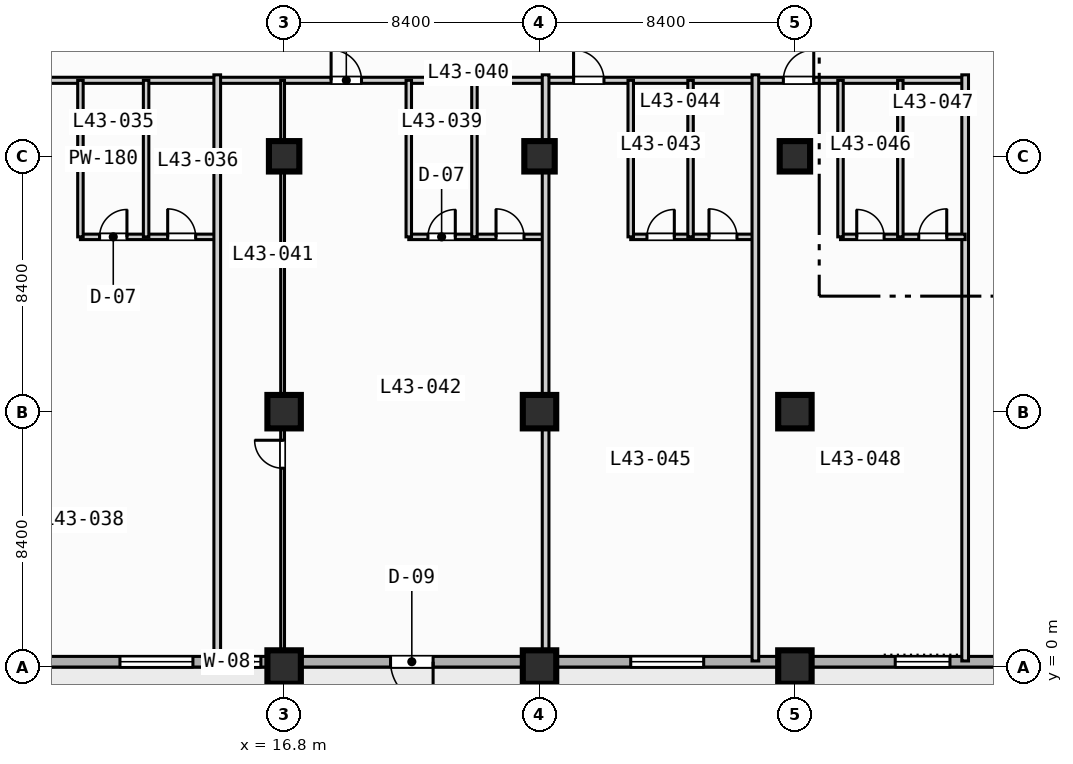
"""IFC4 building model, lengths in metres.
Left out: names, types, materials, properties, quantities, classifications, styles, units other than length and angle.
Written with IfcOpenShell. Run it as: python <this file> out.ifc"""

import sys

from ifc_helpers import new_model, si_unit, direction, frame, frame_2d, origin, origin_2d, place, context, subcontext, project, spatial, rectangle, extrude, element, fill, save


model = new_model("IFC4")
c1 = context("Model", 3, precision=1e-05, world=origin(), true_north=direction((0.0, 1.0)))
c2 = subcontext(c1, "Body", "Model", "MODEL_VIEW")
j1 = project(units=[si_unit("LENGTHUNIT", "METRE"), si_unit("PLANEANGLEUNIT", "RADIAN")], contexts=[c1])
p1 = place(None, origin())
s1 = spatial("IfcSite", under=j1, at=p1, CompositionType="ELEMENT")
p2 = place(p1, origin())
s2 = spatial("IfcBuilding", under=s1, at=p2, CompositionType="ELEMENT")
p3 = place(p2, frame((0.0, 0.0, 179.1)))
s3 = spatial("IfcBuildingStorey", under=s2, at=p3, CompositionType="ELEMENT", Elevation=179.1)
for number, where, z_axis, x_axis in (
    (1, (16.8, 0.0, 0.0), (0.0, 0.0, 1.0), (1.0, 0.0, 0.0)),
    (2, (16.8, 8.4, 0.0), (0.0, 0.0, 1.0), (1.0, 0.0, 0.0)),
):
    element("IfcColumn", number, at=place(p3, frame(where, z_axis=z_axis, x_axis=x_axis)), inside=s3, PredefinedType="COLUMN", context=c2, shape_type="SweptSolid", body=[
        extrude(rectangle(XDim=1.1, YDim=1.1, at=origin_2d()), origin(), (0.0, 0.0, 1.0), 3.7),
    ])
p4 = place(p3, frame((16.8, 16.8, 0.0), z_axis=(0.0, 0.0, 1.0), x_axis=(1.0, 0.0, 0.0)))
e3 = element("IfcColumn", 3, at=p4, inside=s3, PredefinedType="COLUMN", context=c2, shape_type="SweptSolid", body=[
    extrude(rectangle(XDim=1.0, YDim=1.0, at=origin_2d()), origin(), (0.0, 0.0, 1.0), 3.7),
])
for number, where, z_axis, x_axis in (
    (4, (25.2, 0.0, 0.0), (0.0, 0.0, 1.0), (1.0, 0.0, 0.0)),
    (5, (25.2, 8.4, 0.0), (0.0, 0.0, 1.0), (1.0, 0.0, 0.0)),
):
    element("IfcColumn", number, at=place(p3, frame(where, z_axis=z_axis, x_axis=x_axis)), inside=s3, PredefinedType="COLUMN", context=c2, shape_type="SweptSolid", body=[
        extrude(rectangle(XDim=1.1, YDim=1.1, at=origin_2d()), origin(), (0.0, 0.0, 1.0), 3.7),
    ])
p5 = place(p3, frame((25.2, 16.8, 0.0), z_axis=(0.0, 0.0, 1.0), x_axis=(1.0, 0.0, 0.0)))
e6 = element("IfcColumn", 6, at=p5, inside=s3, PredefinedType="COLUMN", context=c2, shape_type="SweptSolid", body=[
    extrude(rectangle(XDim=1.0, YDim=1.0, at=origin_2d()), origin(), (0.0, 0.0, 1.0), 3.7),
])
for number, where, z_axis, x_axis in (
    (7, (33.6, 0.0, 0.0), (0.0, 0.0, 1.0), (1.0, 0.0, 0.0)),
    (8, (33.6, 8.4, 0.0), (0.0, 0.0, 1.0), (1.0, 0.0, 0.0)),
):
    element("IfcColumn", number, at=place(p3, frame(where, z_axis=z_axis, x_axis=x_axis)), inside=s3, PredefinedType="COLUMN", context=c2, shape_type="SweptSolid", body=[
        extrude(rectangle(XDim=1.1, YDim=1.1, at=origin_2d()), origin(), (0.0, 0.0, 1.0), 3.7),
    ])
p6 = place(p3, frame((33.6, 16.8, 0.0), z_axis=(0.0, 0.0, 1.0), x_axis=(1.0, 0.0, 0.0)))
e9 = element("IfcColumn", 9, at=p6, inside=s3, PredefinedType="COLUMN", context=c2, shape_type="SweptSolid", body=[
    extrude(rectangle(XDim=1.0, YDim=1.0, at=origin_2d()), origin(), (0.0, 0.0, 1.0), 3.7),
])
p7 = place(p3, frame((72.425, 0.175, 0.0), z_axis=(0.0, 0.0, 1.0), x_axis=(-1.0, 0.0, 0.0)))
e10 = element("IfcWall", 10, at=p7, inside=s3, PredefinedType="STANDARD", context=c2, shape_type="SweptSolid", body=[
    extrude(rectangle(XDim=69.25, YDim=0.35, at=frame_2d((34.625, 0.0))), origin(), (0.0, 0.0, 1.0), 3.47),
])
p8 = place(p7, frame((50.725, 0.0, 0.0)))
e11 = element("IfcOpeningElement", 11, at=p8, cuts=e10, PredefinedType="OPENING", context=c2, shape_type="SweptSolid", body=[
    extrude(rectangle(XDim=1.4, YDim=2.2, at=frame_2d((0.7, 1.1))), frame((0.0, 0.185, 0.0), z_axis=(0.0, -1.0, 0.0), x_axis=(1.0, 0.0, 0.0)), (0.0, 0.0, 1.0), 0.37),
])
p9 = place(p7, frame((58.625, 0.0, 0.85)))
e12 = element("IfcOpeningElement", 12, at=p9, cuts=e10, PredefinedType="OPENING", context=c2, shape_type="SweptSolid", body=[
    extrude(rectangle(XDim=2.4, YDim=1.95, at=frame_2d((1.2, 0.975))), frame((0.0, 0.185, 0.0), z_axis=(0.0, -1.0, 0.0), x_axis=(1.0, 0.0, 0.0)), (0.0, 0.0, 1.0), 0.37),
])
p10 = place(p7, frame((41.825, 0.0, 0.85)))
e13 = element("IfcOpeningElement", 13, at=p10, cuts=e10, PredefinedType="OPENING", context=c2, shape_type="SweptSolid", body=[
    extrude(rectangle(XDim=2.4, YDim=1.95, at=frame_2d((1.2, 0.975))), frame((0.0, 0.185, 0.0), z_axis=(0.0, -1.0, 0.0), x_axis=(1.0, 0.0, 0.0)), (0.0, 0.0, 1.0), 0.37),
])
p11 = place(p7, frame((33.725, 0.0, 0.85)))
e14 = element("IfcOpeningElement", 14, at=p11, cuts=e10, PredefinedType="OPENING", context=c2, shape_type="SweptSolid", body=[
    extrude(rectangle(XDim=1.8, YDim=1.8, at=frame_2d((0.9, 0.9))), frame((0.0, 0.185, 0.0), z_axis=(0.0, -1.0, 0.0), x_axis=(1.0, 0.0, 0.0)), (0.0, 0.0, 1.0), 0.37),
])
p12 = place(p7, frame((25.025, 0.0, 0.85)))
e15 = element("IfcOpeningElement", 15, at=p12, cuts=e10, PredefinedType="OPENING", context=c2, shape_type="SweptSolid", body=[
    extrude(rectangle(XDim=2.4, YDim=1.95, at=frame_2d((1.2, 0.975))), frame((0.0, 0.185, 0.0), z_axis=(0.0, -1.0, 0.0), x_axis=(1.0, 0.0, 0.0)), (0.0, 0.0, 1.0), 0.37),
])
p13 = place(p7, frame((67.075, 0.0, 0.85)))
e16 = element("IfcOpeningElement", 16, at=p13, cuts=e10, PredefinedType="OPENING", context=c2, shape_type="SweptSolid", body=[
    extrude(rectangle(XDim=1.8, YDim=1.8, at=frame_2d((0.9, 0.9))), frame((0.0, 0.185, 0.0), z_axis=(0.0, -1.0, 0.0), x_axis=(1.0, 0.0, 0.0)), (0.0, 0.0, 1.0), 0.37),
])
p14 = place(p7, frame((56.39, 0.0, 0.85)))
e17 = element("IfcOpeningElement", 17, at=p14, cuts=e10, PredefinedType="OPENING", context=c2, shape_type="SweptSolid", body=[
    extrude(rectangle(XDim=0.72, YDim=1.8, at=frame_2d((0.36, 0.9))), frame((0.0, 0.185, 0.0), z_axis=(0.0, -1.0, 0.0), x_axis=(1.0, 0.0, 0.0)), (0.0, 0.0, 1.0), 0.37),
])
p15 = place(p7, frame((9.075, 0.0, 0.85)))
e18 = element("IfcOpeningElement", 18, at=p15, cuts=e10, PredefinedType="OPENING", context=c2, shape_type="SweptSolid", body=[
    extrude(rectangle(XDim=1.8, YDim=1.8, at=frame_2d((0.9, 0.9))), frame((0.0, 0.185, 0.0), z_axis=(0.0, -1.0, 0.0), x_axis=(1.0, 0.0, 0.0)), (0.0, 0.0, 1.0), 0.37),
])
p16 = place(p7, frame((2.675, 0.0, 0.85)))
e19 = element("IfcOpeningElement", 19, at=p16, cuts=e10, PredefinedType="OPENING", context=c2, shape_type="SweptSolid", body=[
    extrude(rectangle(XDim=1.8, YDim=1.8, at=frame_2d((0.9, 0.9))), frame((0.0, 0.185, 0.0), z_axis=(0.0, -1.0, 0.0), x_axis=(1.0, 0.0, 0.0)), (0.0, 0.0, 1.0), 0.37),
])
p17 = place(p3, frame((3.4, 19.3, 0.0), z_axis=(0.0, 0.0, 1.0), x_axis=(1.0, 0.0, 0.0)))
e20 = element("IfcWall", 20, at=p17, inside=s3, PredefinedType="PARTITIONING", context=c2, shape_type="SweptSolid", body=[
    extrude(rectangle(XDim=35.8, YDim=0.2, at=frame_2d((17.9, 0.0))), origin(), (0.0, 0.0, 1.0), 3.47),
])
p18 = place(p17, frame((3.92, 0.0, 0.0)))
e21 = element("IfcOpeningElement", 21, at=p18, cuts=e20, PredefinedType="OPENING", context=c2, shape_type="SweptSolid", body=[
    extrude(rectangle(XDim=1.0, YDim=2.15, at=frame_2d((0.5, 1.075))), frame((0.0, 0.11, 0.0), z_axis=(0.0, -1.0, 0.0), x_axis=(1.0, 0.0, 0.0)), (0.0, 0.0, 1.0), 0.22),
])
p19 = place(p17, frame((14.945, 0.0, 0.0)))
e22 = element("IfcOpeningElement", 22, at=p19, cuts=e20, PredefinedType="OPENING", context=c2, shape_type="SweptSolid", body=[
    extrude(rectangle(XDim=1.0, YDim=2.15, at=frame_2d((0.5, 1.075))), frame((0.0, 0.11, 0.0), z_axis=(0.0, -1.0, 0.0), x_axis=(1.0, 0.0, 0.0)), (0.0, 0.0, 1.0), 0.22),
])
p20 = place(p17, frame((22.92, 0.0, 0.0)))
e23 = element("IfcOpeningElement", 23, at=p20, cuts=e20, PredefinedType="OPENING", context=c2, shape_type="SweptSolid", body=[
    extrude(rectangle(XDim=1.0, YDim=2.15, at=frame_2d((0.5, 1.075))), frame((0.0, 0.11, 0.0), z_axis=(0.0, -1.0, 0.0), x_axis=(1.0, 0.0, 0.0)), (0.0, 0.0, 1.0), 0.22),
])
p21 = place(p17, frame((29.82, 0.0, 0.0)))
e24 = element("IfcOpeningElement", 24, at=p21, cuts=e20, PredefinedType="OPENING", context=c2, shape_type="SweptSolid", body=[
    extrude(rectangle(XDim=1.0, YDim=2.15, at=frame_2d((0.5, 1.075))), frame((0.0, 0.11, 0.0), z_axis=(0.0, -1.0, 0.0), x_axis=(1.0, 0.0, 0.0)), (0.0, 0.0, 1.0), 0.22),
])
p22 = place(p3, frame((10.1, 14.15, 0.0), z_axis=(0.0, 0.0, 1.0), x_axis=(1.0, 0.0, 0.0)))
e25 = element("IfcWall", 25, at=p22, inside=s3, PredefinedType="PLUMBINGWALL", context=c2, shape_type="SweptSolid", body=[
    extrude(rectangle(XDim=4.5, YDim=0.18, at=frame_2d((2.25, 0.0))), origin(), (0.0, 0.0, 1.0), 3.47),
])
p23 = place(p22, frame((0.63, 0.0, 0.0)))
e26 = element("IfcOpeningElement", 26, at=p23, cuts=e25, PredefinedType="OPENING", context=c2, shape_type="SweptSolid", body=[
    extrude(rectangle(XDim=0.9, YDim=2.1, at=frame_2d((0.45, 1.05))), frame((0.0, 0.1, 0.0), z_axis=(0.0, -1.0, 0.0), x_axis=(1.0, 0.0, 0.0)), (0.0, 0.0, 1.0), 0.2),
])
p24 = place(p22, frame((2.87, 0.0, 0.0)))
e27 = element("IfcOpeningElement", 27, at=p24, cuts=e25, PredefinedType="OPENING", context=c2, shape_type="SweptSolid", body=[
    extrude(rectangle(XDim=0.92, YDim=2.1, at=frame_2d((0.46, 1.05))), frame((0.0, 0.1, 0.0), z_axis=(0.0, -1.0, 0.0), x_axis=(1.0, 0.0, 0.0)), (0.0, 0.0, 1.0), 0.2),
])
for number, where, z_axis, x_axis in (
    (28, (10.1, 14.15, 0.0), (0.0, 0.0, 1.0), (0.0, 1.0, 0.0)),
    (29, (12.26, 14.15, 0.0), (0.0, 0.0, 1.0), (0.0, 1.0, 0.0)),
):
    element("IfcWall", number, at=place(p3, frame(where, z_axis=z_axis, x_axis=x_axis)), inside=s3, PredefinedType="PLUMBINGWALL", context=c2, shape_type="SweptSolid", body=[
        extrude(rectangle(XDim=5.15, YDim=0.18, at=frame_2d((2.575, 0.0))), origin(), (0.0, 0.0, 1.0), 3.47),
    ])
p25 = place(p3, frame((14.6, 0.2, 0.0), z_axis=(0.0, 0.0, 1.0), x_axis=(0.0, 1.0, 0.0)))
e30 = element("IfcWall", 30, at=p25, inside=s3, PredefinedType="PARTITIONING", context=c2, shape_type="SweptSolid", body=[
    extrude(rectangle(XDim=19.28, YDim=0.22, at=frame_2d((9.64, 0.0))), origin(), (0.0, 0.0, 1.0), 3.47),
])
p26 = place(p3, frame((20.9, 14.15, 0.0), z_axis=(0.0, 0.0, 1.0), x_axis=(1.0, 0.0, 0.0)))
e31 = element("IfcWall", 31, at=p26, inside=s3, PredefinedType="PLUMBINGWALL", context=c2, shape_type="SweptSolid", body=[
    extrude(rectangle(XDim=4.5, YDim=0.18, at=frame_2d((2.25, 0.0))), origin(), (0.0, 0.0, 1.0), 3.47),
])
p27 = place(p26, frame((0.63, 0.0, 0.0)))
e32 = element("IfcOpeningElement", 32, at=p27, cuts=e31, PredefinedType="OPENING", context=c2, shape_type="SweptSolid", body=[
    extrude(rectangle(XDim=0.9, YDim=2.1, at=frame_2d((0.45, 1.05))), frame((0.0, 0.1, 0.0), z_axis=(0.0, -1.0, 0.0), x_axis=(1.0, 0.0, 0.0)), (0.0, 0.0, 1.0), 0.2),
])
p28 = place(p26, frame((2.87, 0.0, 0.0)))
e33 = element("IfcOpeningElement", 33, at=p28, cuts=e31, PredefinedType="OPENING", context=c2, shape_type="SweptSolid", body=[
    extrude(rectangle(XDim=0.92, YDim=2.1, at=frame_2d((0.46, 1.05))), frame((0.0, 0.1, 0.0), z_axis=(0.0, -1.0, 0.0), x_axis=(1.0, 0.0, 0.0)), (0.0, 0.0, 1.0), 0.2),
])
for number, where, z_axis, x_axis in (
    (34, (20.9, 14.15, 0.0), (0.0, 0.0, 1.0), (0.0, 1.0, 0.0)),
    (35, (23.06, 14.15, 0.0), (0.0, 0.0, 1.0), (0.0, 1.0, 0.0)),
):
    element("IfcWall", number, at=place(p3, frame(where, z_axis=z_axis, x_axis=x_axis)), inside=s3, PredefinedType="PLUMBINGWALL", context=c2, shape_type="SweptSolid", body=[
        extrude(rectangle(XDim=5.15, YDim=0.18, at=frame_2d((2.575, 0.0))), origin(), (0.0, 0.0, 1.0), 3.47),
    ])
p29 = place(p3, frame((16.75, 0.35, 0.0), z_axis=(0.0, 0.0, 1.0), x_axis=(0.0, 1.0, 0.0)))
e36 = element("IfcWall", 36, at=p29, inside=s3, PredefinedType="PARTITIONING", context=c2, shape_type="SweptSolid", body=[
    extrude(rectangle(XDim=18.95, YDim=0.125, at=frame_2d((9.475, 0.0))), origin(), (0.0, 0.0, 1.0), 2.82),
])
p30 = place(p29, frame((6.19, 0.0, 0.0)))
e37 = element("IfcOpeningElement", 37, at=p30, cuts=e36, PredefinedType="OPENING", context=c2, shape_type="SweptSolid", body=[
    extrude(rectangle(XDim=0.92, YDim=2.1, at=frame_2d((0.46, 1.05))), frame((0.0, 0.073, 0.0), z_axis=(0.0, -1.0, 0.0), x_axis=(1.0, 0.0, 0.0)), (0.0, 0.0, 1.0), 0.145),
])
p31 = place(p3, frame((25.4, 0.2, 0.0), z_axis=(0.0, 0.0, 1.0), x_axis=(0.0, 1.0, 0.0)))
e38 = element("IfcWall", 38, at=p31, inside=s3, PredefinedType="PARTITIONING", context=c2, shape_type="SweptSolid", body=[
    extrude(rectangle(XDim=19.28, YDim=0.22, at=frame_2d((9.64, 0.0))), origin(), (0.0, 0.0, 1.0), 2.82),
])
p32 = place(p3, frame((28.2, 14.15, 0.0), z_axis=(0.0, 0.0, 1.0), x_axis=(1.0, 0.0, 0.0)))
e39 = element("IfcWall", 39, at=p32, inside=s3, PredefinedType="PLUMBINGWALL", context=c2, shape_type="SweptSolid", body=[
    extrude(rectangle(XDim=4.1, YDim=0.18, at=frame_2d((2.05, 0.0))), origin(), (0.0, 0.0, 1.0), 3.47),
])
p33 = place(p32, frame((0.534, 0.0, 0.0)))
e40 = element("IfcOpeningElement", 40, at=p33, cuts=e39, PredefinedType="OPENING", context=c2, shape_type="SweptSolid", body=[
    extrude(rectangle(XDim=0.9, YDim=2.1, at=frame_2d((0.45, 1.05))), frame((0.0, 0.1, 0.0), z_axis=(0.0, -1.0, 0.0), x_axis=(1.0, 0.0, 0.0)), (0.0, 0.0, 1.0), 0.2),
])
p34 = place(p32, frame((2.574, 0.0, 0.0)))
e41 = element("IfcOpeningElement", 41, at=p34, cuts=e39, PredefinedType="OPENING", context=c2, shape_type="SweptSolid", body=[
    extrude(rectangle(XDim=0.92, YDim=2.1, at=frame_2d((0.46, 1.05))), frame((0.0, 0.1, 0.0), z_axis=(0.0, -1.0, 0.0), x_axis=(1.0, 0.0, 0.0)), (0.0, 0.0, 1.0), 0.2),
])
for number, where, z_axis, x_axis in (
    (42, (28.2, 14.15, 0.0), (0.0, 0.0, 1.0), (0.0, 1.0, 0.0)),
    (43, (30.168, 14.15, 0.0), (0.0, 0.0, 1.0), (0.0, 1.0, 0.0)),
):
    element("IfcWall", number, at=place(p3, frame(where, z_axis=z_axis, x_axis=x_axis)), inside=s3, PredefinedType="PLUMBINGWALL", context=c2, shape_type="SweptSolid", body=[
        extrude(rectangle(XDim=5.15, YDim=0.18, at=frame_2d((2.575, 0.0))), origin(), (0.0, 0.0, 1.0), 3.47),
    ])
for number, where, z_axis, x_axis in (
    (44, (32.3, 0.2, 0.0), (0.0, 0.0, 1.0), (0.0, 1.0, 0.0)),
    (45, (39.2, 0.2, 0.0), (0.0, 0.0, 1.0), (0.0, 1.0, 0.0)),
):
    element("IfcWall", number, at=place(p3, frame(where, z_axis=z_axis, x_axis=x_axis)), inside=s3, PredefinedType="PARTITIONING", context=c2, shape_type="SweptSolid", body=[
        extrude(rectangle(XDim=19.28, YDim=0.22, at=frame_2d((9.64, 0.0))), origin(), (0.0, 0.0, 1.0), 3.47),
    ])
p35 = place(p3, frame((35.1, 14.15, 0.0), z_axis=(0.0, 0.0, 1.0), x_axis=(1.0, 0.0, 0.0)))
e46 = element("IfcWall", 46, at=p35, inside=s3, PredefinedType="PLUMBINGWALL", context=c2, shape_type="SweptSolid", body=[
    extrude(rectangle(XDim=4.1, YDim=0.18, at=frame_2d((2.05, 0.0))), origin(), (0.0, 0.0, 1.0), 3.47),
])
p36 = place(p35, frame((0.534, 0.0, 0.0)))
e47 = element("IfcOpeningElement", 47, at=p36, cuts=e46, PredefinedType="OPENING", context=c2, shape_type="SweptSolid", body=[
    extrude(rectangle(XDim=0.9, YDim=2.1, at=frame_2d((0.45, 1.05))), frame((0.0, 0.1, 0.0), z_axis=(0.0, -1.0, 0.0), x_axis=(1.0, 0.0, 0.0)), (0.0, 0.0, 1.0), 0.2),
])
p37 = place(p35, frame((2.574, 0.0, 0.0)))
e48 = element("IfcOpeningElement", 48, at=p37, cuts=e46, PredefinedType="OPENING", context=c2, shape_type="SweptSolid", body=[
    extrude(rectangle(XDim=0.92, YDim=2.1, at=frame_2d((0.46, 1.05))), frame((0.0, 0.1, 0.0), z_axis=(0.0, -1.0, 0.0), x_axis=(1.0, 0.0, 0.0)), (0.0, 0.0, 1.0), 0.2),
])
for number, where, z_axis, x_axis in (
    (49, (35.1, 14.15, 0.0), (0.0, 0.0, 1.0), (0.0, 1.0, 0.0)),
    (50, (37.068, 14.15, 0.0), (0.0, 0.0, 1.0), (0.0, 1.0, 0.0)),
):
    element("IfcWall", number, at=place(p3, frame(where, z_axis=z_axis, x_axis=x_axis)), inside=s3, PredefinedType="PLUMBINGWALL", context=c2, shape_type="SweptSolid", body=[
        extrude(rectangle(XDim=5.15, YDim=0.18, at=frame_2d((2.575, 0.0))), origin(), (0.0, 0.0, 1.0), 3.47),
    ])
p38 = place(p8, origin())
e51 = element("IfcDoor", 51, at=p38, inside=s3, OperationType="SINGLE_SWING_LEFT", PredefinedType="DOOR", context=c2, shape_type="SweptSolid", body=[
    extrude(rectangle(XDim=1.4, YDim=2.2, at=frame_2d((0.7, 1.1))), frame((0.0, 0.025, 0.0), z_axis=(0.0, -1.0, 0.0), x_axis=(1.0, 0.0, 0.0)), (0.0, 0.0, 1.0), 0.05),
])
fill(e11, e51)
p39 = place(p9, origin())
e52 = element("IfcWindow", 52, at=p39, inside=s3, PartitioningType="SINGLE_PANEL", PredefinedType="WINDOW", context=c2, shape_type="SweptSolid", body=[
    extrude(rectangle(XDim=2.4, YDim=1.95, at=frame_2d((1.2, 0.975))), frame((0.0, 0.03, 0.0), z_axis=(0.0, -1.0, 0.0), x_axis=(1.0, 0.0, 0.0)), (0.0, 0.0, 1.0), 0.06),
])
fill(e12, e52)
p40 = place(p10, origin())
e53 = element("IfcWindow", 53, at=p40, inside=s3, PartitioningType="SINGLE_PANEL", PredefinedType="WINDOW", context=c2, shape_type="SweptSolid", body=[
    extrude(rectangle(XDim=2.4, YDim=1.95, at=frame_2d((1.2, 0.975))), frame((0.0, 0.03, 0.0), z_axis=(0.0, -1.0, 0.0), x_axis=(1.0, 0.0, 0.0)), (0.0, 0.0, 1.0), 0.06),
])
fill(e13, e53)
p41 = place(p11, origin())
e54 = element("IfcWindow", 54, at=p41, inside=s3, PartitioningType="SINGLE_PANEL", PredefinedType="WINDOW", context=c2, shape_type="SweptSolid", body=[
    extrude(rectangle(XDim=1.8, YDim=1.8, at=frame_2d((0.9, 0.9))), frame((0.0, 0.03, 0.0), z_axis=(0.0, -1.0, 0.0), x_axis=(1.0, 0.0, 0.0)), (0.0, 0.0, 1.0), 0.06),
])
fill(e14, e54)
p42 = place(p14, origin())
e55 = element("IfcWindow", 55, at=p42, inside=s3, PartitioningType="SINGLE_PANEL", PredefinedType="WINDOW", context=c2, shape_type="SweptSolid", body=[
    extrude(rectangle(XDim=0.72, YDim=1.8, at=frame_2d((0.36, 0.9))), frame((0.0, 0.03, 0.0), z_axis=(0.0, -1.0, 0.0), x_axis=(1.0, 0.0, 0.0)), (0.0, 0.0, 1.0), 0.06),
])
fill(e17, e55)
p43 = place(p19, origin())
e56 = element("IfcDoor", 56, at=p43, inside=s3, OperationType="SINGLE_SWING_LEFT", PredefinedType="DOOR", context=c2, shape_type="SweptSolid", body=[
    extrude(rectangle(XDim=1.0, YDim=2.15, at=frame_2d((0.5, 1.075))), frame((0.0, 0.025, 0.0), z_axis=(0.0, -1.0, 0.0), x_axis=(1.0, 0.0, 0.0)), (0.0, 0.0, 1.0), 0.05),
])
fill(e22, e56)
p44 = place(p20, origin())
e57 = element("IfcDoor", 57, at=p44, inside=s3, OperationType="SINGLE_SWING_LEFT", PredefinedType="DOOR", context=c2, shape_type="SweptSolid", body=[
    extrude(rectangle(XDim=1.0, YDim=2.15, at=frame_2d((0.5, 1.075))), frame((0.0, 0.025, 0.0), z_axis=(0.0, -1.0, 0.0), x_axis=(1.0, 0.0, 0.0)), (0.0, 0.0, 1.0), 0.05),
])
fill(e23, e57)
p45 = place(p21, origin())
e58 = element("IfcDoor", 58, at=p45, inside=s3, OperationType="SINGLE_SWING_RIGHT", PredefinedType="DOOR", context=c2, shape_type="SweptSolid", body=[
    extrude(rectangle(XDim=1.0, YDim=2.15, at=frame_2d((0.5, 1.075))), frame((0.0, 0.025, 0.0), z_axis=(0.0, -1.0, 0.0), x_axis=(1.0, 0.0, 0.0)), (0.0, 0.0, 1.0), 0.05),
])
fill(e24, e58)
p46 = place(p23, origin())
e59 = element("IfcDoor", 59, at=p46, inside=s3, OperationType="SINGLE_SWING_RIGHT", PredefinedType="DOOR", context=c2, shape_type="SweptSolid", body=[
    extrude(rectangle(XDim=0.9, YDim=2.1, at=frame_2d((0.45, 1.05))), frame((0.0, 0.025, 0.0), z_axis=(0.0, -1.0, 0.0), x_axis=(1.0, 0.0, 0.0)), (0.0, 0.0, 1.0), 0.05),
])
fill(e26, e59)
p47 = place(p24, origin())
e60 = element("IfcDoor", 60, at=p47, inside=s3, OperationType="SINGLE_SWING_LEFT", PredefinedType="DOOR", context=c2, shape_type="SweptSolid", body=[
    extrude(rectangle(XDim=0.92, YDim=2.1, at=frame_2d((0.46, 1.05))), frame((0.0, 0.025, 0.0), z_axis=(0.0, -1.0, 0.0), x_axis=(1.0, 0.0, 0.0)), (0.0, 0.0, 1.0), 0.05),
])
fill(e27, e60)
p48 = place(p27, origin())
e61 = element("IfcDoor", 61, at=p48, inside=s3, OperationType="SINGLE_SWING_RIGHT", PredefinedType="DOOR", context=c2, shape_type="SweptSolid", body=[
    extrude(rectangle(XDim=0.9, YDim=2.1, at=frame_2d((0.45, 1.05))), frame((0.0, 0.025, 0.0), z_axis=(0.0, -1.0, 0.0), x_axis=(1.0, 0.0, 0.0)), (0.0, 0.0, 1.0), 0.05),
])
fill(e32, e61)
p49 = place(p28, origin())
e62 = element("IfcDoor", 62, at=p49, inside=s3, OperationType="SINGLE_SWING_LEFT", PredefinedType="DOOR", context=c2, shape_type="SweptSolid", body=[
    extrude(rectangle(XDim=0.92, YDim=2.1, at=frame_2d((0.46, 1.05))), frame((0.0, 0.025, 0.0), z_axis=(0.0, -1.0, 0.0), x_axis=(1.0, 0.0, 0.0)), (0.0, 0.0, 1.0), 0.05),
])
fill(e33, e62)
p50 = place(p30, origin())
e63 = element("IfcDoor", 63, at=p50, inside=s3, OperationType="SINGLE_SWING_RIGHT", PredefinedType="DOOR", context=c2, shape_type="SweptSolid", body=[
    extrude(rectangle(XDim=0.92, YDim=2.1, at=frame_2d((0.46, 1.05))), frame((0.0, 0.025, 0.0), z_axis=(0.0, -1.0, 0.0), x_axis=(1.0, 0.0, 0.0)), (0.0, 0.0, 1.0), 0.05),
])
fill(e37, e63)
p51 = place(p33, origin())
e64 = element("IfcDoor", 64, at=p51, inside=s3, OperationType="SINGLE_SWING_RIGHT", PredefinedType="DOOR", context=c2, shape_type="SweptSolid", body=[
    extrude(rectangle(XDim=0.9, YDim=2.1, at=frame_2d((0.45, 1.05))), frame((0.0, 0.025, 0.0), z_axis=(0.0, -1.0, 0.0), x_axis=(1.0, 0.0, 0.0)), (0.0, 0.0, 1.0), 0.05),
])
fill(e40, e64)
p52 = place(p34, origin())
e65 = element("IfcDoor", 65, at=p52, inside=s3, OperationType="SINGLE_SWING_LEFT", PredefinedType="DOOR", context=c2, shape_type="SweptSolid", body=[
    extrude(rectangle(XDim=0.92, YDim=2.1, at=frame_2d((0.46, 1.05))), frame((0.0, 0.025, 0.0), z_axis=(0.0, -1.0, 0.0), x_axis=(1.0, 0.0, 0.0)), (0.0, 0.0, 1.0), 0.05),
])
fill(e41, e65)
p53 = place(p36, origin())
e66 = element("IfcDoor", 66, at=p53, inside=s3, OperationType="SINGLE_SWING_LEFT", PredefinedType="DOOR", context=c2, shape_type="SweptSolid", body=[
    extrude(rectangle(XDim=0.9, YDim=2.1, at=frame_2d((0.45, 1.05))), frame((0.0, 0.025, 0.0), z_axis=(0.0, -1.0, 0.0), x_axis=(1.0, 0.0, 0.0)), (0.0, 0.0, 1.0), 0.05),
])
fill(e47, e66)
p54 = place(p37, origin())
e67 = element("IfcDoor", 67, at=p54, inside=s3, OperationType="SINGLE_SWING_RIGHT", PredefinedType="DOOR", context=c2, shape_type="SweptSolid", body=[
    extrude(rectangle(XDim=0.92, YDim=2.1, at=frame_2d((0.46, 1.05))), frame((0.0, 0.025, 0.0), z_axis=(0.0, -1.0, 0.0), x_axis=(1.0, 0.0, 0.0)), (0.0, 0.0, 1.0), 0.05),
])
fill(e48, e67)
save(model, sys.argv[1])
